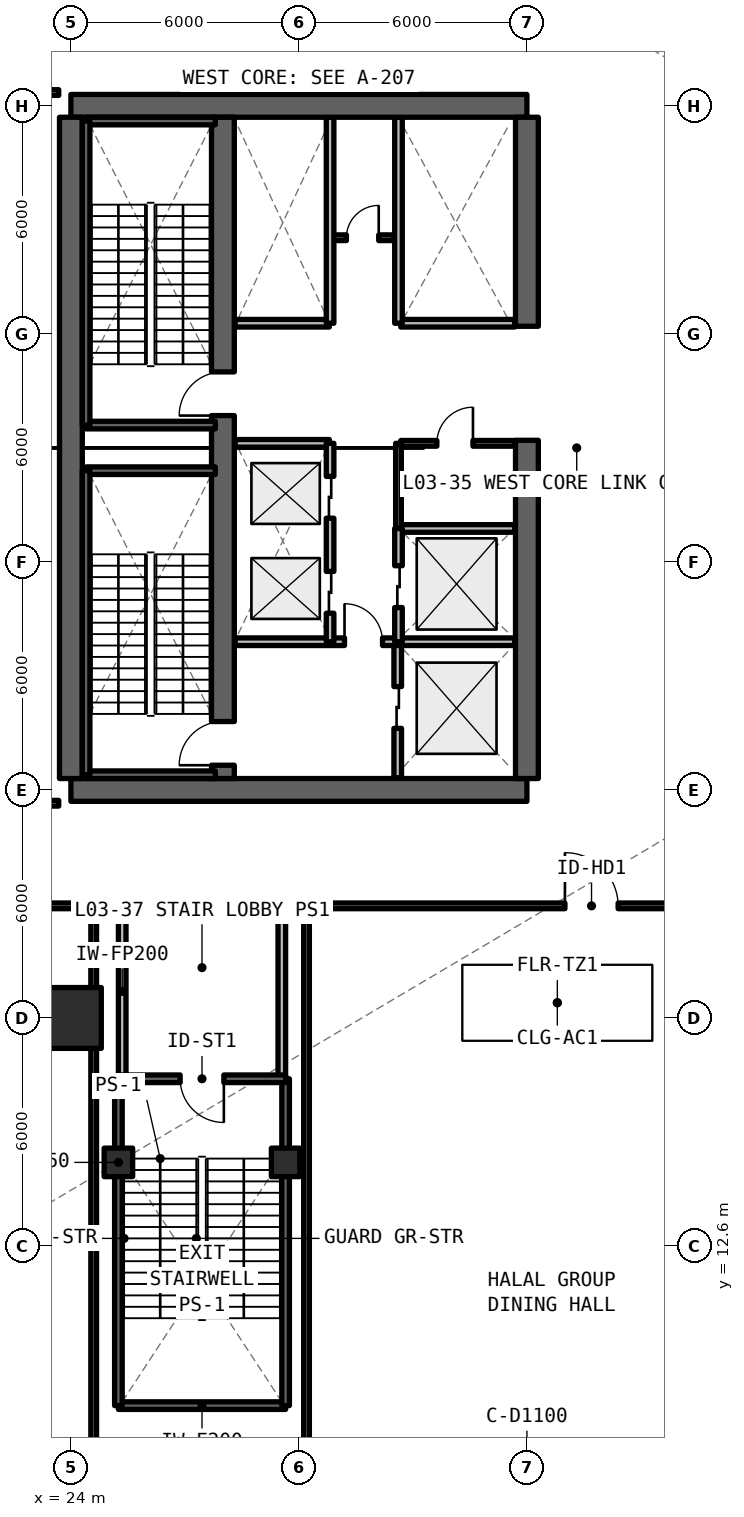
"""IFC4 building model, lengths in metres.
Left out: names, types, materials, properties, quantities, classifications, styles, units other than length and angle.
Written with IfcOpenShell. Run it as: python <this file> out.ifc"""

import sys

from ifc_helpers import new_model, si_unit, direction, frame, frame_2d, origin, origin_2d, place, context, subcontext, project, spatial, rectangle, extrude, element, fill, save


model = new_model("IFC4")
c1 = context("Model", 3, precision=1e-05, world=origin(), true_north=direction((0.0, 1.0)))
c2 = subcontext(c1, "Body", "Model", "MODEL_VIEW")
j1 = project(units=[si_unit("LENGTHUNIT", "METRE"), si_unit("PLANEANGLEUNIT", "RADIAN")], contexts=[c1])
p1 = place(None, origin())
s1 = spatial("IfcSite", under=j1, at=p1, CompositionType="ELEMENT")
p2 = place(p1, origin())
s2 = spatial("IfcBuilding", under=s1, at=p2, CompositionType="ELEMENT")
p3 = place(p2, frame((0.0, 0.0, 9.9)))
s3 = spatial("IfcBuildingStorey", under=s2, at=p3, CompositionType="ELEMENT", Elevation=9.9)
for number, where, z_axis, x_axis in (
    (1, (24.0, 24.6, 0.0), (0.0, 0.0, 1.0), (1.0, 0.0, 0.0)),
    (2, (36.0, 42.6, 0.0), (0.0, 0.0, 1.0), (-1.0, 0.0, 0.0)),
):
    element("IfcWall", number, at=place(p3, frame(where, z_axis=z_axis, x_axis=x_axis)), inside=s3, PredefinedType="SHEAR", context=c2, shape_type="SweptSolid", body=[
        extrude(rectangle(XDim=12.0, YDim=0.6, at=frame_2d((6.0, 0.0))), origin(), (0.0, 0.0, 1.0), 4.95),
    ])
p4 = place(p3, frame((24.0, 24.9, 0.0), z_axis=(0.0, 0.0, 1.0), x_axis=(0.0, 1.0, 0.0)))
e3 = element("IfcWall", 3, at=p4, inside=s3, PredefinedType="SHEAR", context=c2, shape_type="SweptSolid", body=[
    extrude(rectangle(XDim=17.4, YDim=0.6, at=frame_2d((8.7, 0.0))), origin(), (0.0, 0.0, 1.0), 4.95),
])
p5 = place(p3, frame((36.0, 24.9, 0.0), z_axis=(0.0, 0.0, 1.0), x_axis=(0.0, 1.0, 0.0)))
e4 = element("IfcWall", 4, at=p5, inside=s3, PredefinedType="SHEAR", context=c2, shape_type="SweptSolid", body=[
    extrude(rectangle(XDim=8.9, YDim=0.6, at=frame_2d((4.45, 0.0))), origin(), (0.0, 0.0, 1.0), 4.95),
])
p6 = place(p3, frame((36.0, 36.8, 0.0), z_axis=(0.0, 0.0, 1.0), x_axis=(0.0, 1.0, 0.0)))
e5 = element("IfcWall", 5, at=p6, inside=s3, PredefinedType="SHEAR", context=c2, shape_type="SweptSolid", body=[
    extrude(rectangle(XDim=5.5, YDim=0.6, at=frame_2d((2.75, 0.0))), origin(), (0.0, 0.0, 1.0), 4.95),
])
p7 = place(p3, frame((28.0, 24.9, 0.0), z_axis=(0.0, 0.0, 1.0), x_axis=(0.0, 1.0, 0.0)))
e6 = element("IfcWall", 6, at=p7, inside=s3, PredefinedType="SHEAR", context=c2, shape_type="SweptSolid", body=[
    extrude(rectangle(XDim=17.4, YDim=0.6, at=frame_2d((8.7, 0.0))), origin(), (0.0, 0.0, 1.0), 4.95),
])
p8 = place(p7, frame((0.35, 0.0, 0.0)))
e7 = element("IfcOpeningElement", 7, at=p8, cuts=e6, PredefinedType="OPENING", context=c2, shape_type="SweptSolid", body=[
    extrude(rectangle(XDim=1.15, YDim=2.15, at=frame_2d((0.575, 1.075))), frame((0.0, 0.31, 0.0), z_axis=(0.0, -1.0, 0.0), x_axis=(1.0, 0.0, 0.0)), (0.0, 0.0, 1.0), 0.62),
])
p9 = place(p7, frame((9.55, 0.0, 0.0)))
e8 = element("IfcOpeningElement", 8, at=p9, cuts=e6, PredefinedType="OPENING", context=c2, shape_type="SweptSolid", body=[
    extrude(rectangle(XDim=1.15, YDim=2.15, at=frame_2d((0.575, 1.075))), frame((0.0, 0.31, 0.0), z_axis=(0.0, -1.0, 0.0), x_axis=(1.0, 0.0, 0.0)), (0.0, 0.0, 1.0), 0.62),
])
p10 = place(p3, frame((24.0, 18.6, 0.0), z_axis=(0.0, 0.0, 1.0), x_axis=(1.0, 0.0, 0.0)))
e9 = element("IfcColumn", 9, at=p10, inside=s3, PredefinedType="COLUMN", context=c2, shape_type="SweptSolid", body=[
    extrude(rectangle(XDim=1.6, YDim=1.6, at=origin_2d()), origin(), (0.0, 0.0, 1.0), 4.95),
])
for number, where, z_axis, x_axis in (
    (10, (25.25, 14.8, 0.0), (0.0, 0.0, 1.0), (1.0, 0.0, 0.0)),
    (11, (29.65, 14.8, 0.0), (0.0, 0.0, 1.0), (1.0, 0.0, 0.0)),
):
    element("IfcColumn", number, at=place(p3, frame(where, z_axis=z_axis, x_axis=x_axis)), inside=s3, PredefinedType="COLUMN", context=c2, shape_type="SweptSolid", body=[
        extrude(rectangle(XDim=0.75, YDim=0.75, at=origin_2d()), origin(), (0.0, 0.0, 1.0), 4.95),
    ])
p11 = place(p3, frame((32.6, 24.92, 0.0), z_axis=(0.0, 0.0, 1.0), x_axis=(0.0, 1.0, 0.0)))
e12 = element("IfcWall", 12, at=p11, inside=s3, PredefinedType="SOLIDWALL", context=c2, shape_type="SweptSolid", body=[
    extrude(rectangle(XDim=3.58, YDim=0.2, at=frame_2d((1.79, 0.0))), origin(), (0.0, 0.0, 1.0), 3.89),
])
p12 = place(p11, frame((1.3, 0.0, 0.0)))
e13 = element("IfcOpeningElement", 13, at=p12, cuts=e12, PredefinedType="OPENING", context=c2, shape_type="SweptSolid", body=[
    extrude(rectangle(XDim=1.1, YDim=2.2, at=frame_2d((0.55, 1.1))), frame((0.0, 0.11, 0.0), z_axis=(0.0, -1.0, 0.0), x_axis=(1.0, 0.0, 0.0)), (0.0, 0.0, 1.0), 0.22),
])
p13 = place(p3, frame((28.32, 28.5, 0.0), z_axis=(0.0, 0.0, 1.0), x_axis=(1.0, 0.0, 0.0)))
e14 = element("IfcWall", 14, at=p13, inside=s3, PredefinedType="SOLIDWALL", context=c2, shape_type="SweptSolid", body=[
    extrude(rectangle(XDim=7.36, YDim=0.2, at=frame_2d((3.68, 0.0))), origin(), (0.0, 0.0, 1.0), 3.89),
])
p14 = place(p13, frame((2.88, 0.0, 0.0)))
e15 = element("IfcOpeningElement", 15, at=p14, cuts=e14, PredefinedType="OPENING", context=c2, shape_type="SweptSolid", body=[
    extrude(rectangle(XDim=1.0, YDim=2.15, at=frame_2d((0.5, 1.075))), frame((0.0, 0.11, 0.0), z_axis=(0.0, -1.0, 0.0), x_axis=(1.0, 0.0, 0.0)), (0.0, 0.0, 1.0), 0.22),
])
p15 = place(p3, frame((30.9, 39.13, 0.0), z_axis=(0.0, 0.0, 1.0), x_axis=(1.0, 0.0, 0.0)))
e16 = element("IfcWall", 16, at=p15, inside=s3, PredefinedType="SOLIDWALL", context=c2, shape_type="SweptSolid", body=[
    extrude(rectangle(XDim=1.6, YDim=0.15, at=frame_2d((0.8, 0.0))), origin(), (0.0, 0.0, 1.0), 3.89),
])
p16 = place(p15, frame((0.35, 0.0, 0.0)))
e17 = element("IfcOpeningElement", 17, at=p16, cuts=e16, PredefinedType="OPENING", context=c2, shape_type="SweptSolid", body=[
    extrude(rectangle(XDim=0.85, YDim=2.1, at=frame_2d((0.425, 1.05))), frame((0.0, 0.085, 0.0), z_axis=(0.0, -1.0, 0.0), x_axis=(1.0, 0.0, 0.0)), (0.0, 0.0, 1.0), 0.17),
])
p17 = place(p3, frame((28.32, 33.72, 0.0), z_axis=(0.0, 0.0, 1.0), x_axis=(1.0, 0.0, 0.0)))
e18 = element("IfcWall", 18, at=p17, inside=s3, PredefinedType="SOLIDWALL", context=c2, shape_type="SweptSolid", body=[
    extrude(rectangle(XDim=2.48, YDim=0.2, at=frame_2d((1.24, 0.0))), origin(), (0.0, 0.0, 1.0), 3.89),
])
p18 = place(p3, frame((30.82, 28.5, 0.0), z_axis=(0.0, 0.0, 1.0), x_axis=(0.0, 1.0, 0.0)))
e19 = element("IfcWall", 19, at=p18, inside=s3, PredefinedType="SOLIDWALL", context=c2, shape_type="SweptSolid", body=[
    extrude(rectangle(XDim=5.22, YDim=0.2, at=frame_2d((2.61, 0.0))), origin(), (0.0, 0.0, 1.0), 3.89),
])
p19 = place(p18, frame((0.75, 0.0, 0.0)))
e20 = element("IfcOpeningElement", 20, at=p19, cuts=e19, PredefinedType="OPENING", context=c2, shape_type="SweptSolid", body=[
    extrude(rectangle(XDim=1.1, YDim=2.2, at=frame_2d((0.55, 1.1))), frame((0.0, 0.11, 0.0), z_axis=(0.0, -1.0, 0.0), x_axis=(1.0, 0.0, 0.0)), (0.0, 0.0, 1.0), 0.22),
])
p20 = place(p18, frame((3.25, 0.0, 0.0)))
e21 = element("IfcOpeningElement", 21, at=p20, cuts=e19, PredefinedType="OPENING", context=c2, shape_type="SweptSolid", body=[
    extrude(rectangle(XDim=1.1, YDim=2.2, at=frame_2d((0.55, 1.1))), frame((0.0, 0.11, 0.0), z_axis=(0.0, -1.0, 0.0), x_axis=(1.0, 0.0, 0.0)), (0.0, 0.0, 1.0), 0.22),
])
p21 = place(p3, frame((32.68, 31.48, 0.0), z_axis=(0.0, 0.0, 1.0), x_axis=(1.0, 0.0, 0.0)))
e22 = element("IfcWall", 22, at=p21, inside=s3, PredefinedType="SOLIDWALL", context=c2, shape_type="SweptSolid", body=[
    extrude(rectangle(XDim=3.0, YDim=0.2, at=frame_2d((1.5, 0.0))), origin(), (0.0, 0.0, 1.0), 3.89),
])
p22 = place(p3, frame((32.62, 28.5, 0.0), z_axis=(0.0, 0.0, 1.0), x_axis=(0.0, 1.0, 0.0)))
e23 = element("IfcWall", 23, at=p22, inside=s3, PredefinedType="SOLIDWALL", context=c2, shape_type="SweptSolid", body=[
    extrude(rectangle(XDim=2.98, YDim=0.2, at=frame_2d((1.49, 0.0))), origin(), (0.0, 0.0, 1.0), 3.89),
])
p23 = place(p22, frame((0.9, 0.0, 0.0)))
e24 = element("IfcOpeningElement", 24, at=p23, cuts=e23, PredefinedType="OPENING", context=c2, shape_type="SweptSolid", body=[
    extrude(rectangle(XDim=1.1, YDim=2.2, at=frame_2d((0.55, 1.1))), frame((0.0, 0.11, 0.0), z_axis=(0.0, -1.0, 0.0), x_axis=(1.0, 0.0, 0.0)), (0.0, 0.0, 1.0), 0.22),
])
p24 = place(p3, frame((32.62, 31.48, 0.0), z_axis=(0.0, 0.0, 1.0), x_axis=(0.0, 1.0, 0.0)))
e25 = element("IfcWall", 25, at=p24, inside=s3, PredefinedType="SOLIDWALL", context=c2, shape_type="SweptSolid", body=[
    extrude(rectangle(XDim=2.24, YDim=0.15, at=frame_2d((1.12, 0.0))), origin(), (0.0, 0.0, 1.0), 3.89),
])
p25 = place(p3, frame((32.68, 33.72, 0.0), z_axis=(0.0, 0.0, 1.0), x_axis=(1.0, 0.0, 0.0)))
e26 = element("IfcWall", 26, at=p25, inside=s3, PredefinedType="SOLIDWALL", context=c2, shape_type="SweptSolid", body=[
    extrude(rectangle(XDim=3.0, YDim=0.15, at=frame_2d((1.5, 0.0))), origin(), (0.0, 0.0, 1.0), 3.89),
])
p26 = place(p25, frame((0.95, 0.0, 0.0)))
e27 = element("IfcOpeningElement", 27, at=p26, cuts=e26, PredefinedType="OPENING", context=c2, shape_type="SweptSolid", body=[
    extrude(rectangle(XDim=0.95, YDim=2.15, at=frame_2d((0.475, 1.075))), frame((0.0, 0.085, 0.0), z_axis=(0.0, -1.0, 0.0), x_axis=(1.0, 0.0, 0.0)), (0.0, 0.0, 1.0), 0.17),
])
p27 = place(p3, frame((28.32, 36.88, 0.0), z_axis=(0.0, 0.0, 1.0), x_axis=(1.0, 0.0, 0.0)))
e28 = element("IfcWall", 28, at=p27, inside=s3, PredefinedType="SOLIDWALL", context=c2, shape_type="SweptSolid", body=[
    extrude(rectangle(XDim=2.48, YDim=0.2, at=frame_2d((1.24, 0.0))), origin(), (0.0, 0.0, 1.0), 3.89),
])
p28 = place(p3, frame((30.82, 36.88, 0.0), z_axis=(0.0, 0.0, 1.0), x_axis=(0.0, 1.0, 0.0)))
e29 = element("IfcWall", 29, at=p28, inside=s3, PredefinedType="SOLIDWALL", context=c2, shape_type="SweptSolid", body=[
    extrude(rectangle(XDim=5.42, YDim=0.2, at=frame_2d((2.71, 0.0))), origin(), (0.0, 0.0, 1.0), 3.89),
])
p29 = place(p3, frame((32.68, 36.88, 0.0), z_axis=(0.0, 0.0, 1.0), x_axis=(1.0, 0.0, 0.0)))
e30 = element("IfcWall", 30, at=p29, inside=s3, PredefinedType="SOLIDWALL", context=c2, shape_type="SweptSolid", body=[
    extrude(rectangle(XDim=3.0, YDim=0.2, at=frame_2d((1.5, 0.0))), origin(), (0.0, 0.0, 1.0), 3.89),
])
p30 = place(p3, frame((32.62, 36.88, 0.0), z_axis=(0.0, 0.0, 1.0), x_axis=(0.0, 1.0, 0.0)))
e31 = element("IfcWall", 31, at=p30, inside=s3, PredefinedType="SOLIDWALL", context=c2, shape_type="SweptSolid", body=[
    extrude(rectangle(XDim=5.42, YDim=0.2, at=frame_2d((2.71, 0.0))), origin(), (0.0, 0.0, 1.0), 3.89),
])
for number, where, z_axis, x_axis in (
    (32, (25.35, 17.0, 0.0), (0.0, 0.0, 1.0), (0.0, 1.0, 0.0)),
    (33, (29.55, 17.0, 0.0), (0.0, 0.0, 1.0), (0.0, 1.0, 0.0)),
):
    element("IfcWall", number, at=place(p3, frame(where, z_axis=z_axis, x_axis=x_axis)), inside=s3, PredefinedType="SOLIDWALL", context=c2, shape_type="SweptSolid", body=[
        extrude(rectangle(XDim=4.6, YDim=0.2, at=frame_2d((2.3, 0.0))), origin(), (0.0, 0.0, 1.0), 3.89),
    ])
p31 = place(p3, frame((6.4, 21.55, 0.0), z_axis=(0.0, 0.0, 1.0), x_axis=(1.0, 0.0, 0.0)))
e34 = element("IfcWall", 34, at=p31, inside=s3, PredefinedType="SOLIDWALL", context=c2, shape_type="SweptSolid", body=[
    extrude(rectangle(XDim=18.2, YDim=0.15, at=frame_2d((9.1, 0.0))), origin(), (0.0, 0.0, 1.0), 3.89),
])
p32 = place(p31, frame((8.55, 0.0, 0.0)))
e35 = element("IfcOpeningElement", 35, at=p32, cuts=e34, PredefinedType="OPENING", context=c2, shape_type="SweptSolid", body=[
    extrude(rectangle(XDim=1.1, YDim=2.15, at=frame_2d((0.55, 1.075))), frame((0.0, 0.085, 0.0), z_axis=(0.0, -1.0, 0.0), x_axis=(1.0, 0.0, 0.0)), (0.0, 0.0, 1.0), 0.17),
])
p33 = place(p3, frame((24.6, 2.3, 0.0), z_axis=(0.0, 0.0, 1.0), x_axis=(0.0, 1.0, 0.0)))
e36 = element("IfcWall", 36, at=p33, inside=s3, PredefinedType="SOLIDWALL", context=c2, shape_type="SweptSolid", body=[
    extrude(rectangle(XDim=19.25, YDim=0.15, at=frame_2d((9.625, 0.0))), origin(), (0.0, 0.0, 1.0), 3.89),
])
p34 = place(p3, frame((30.2, 21.55, 0.0), z_axis=(0.0, 0.0, 1.0), x_axis=(1.0, 0.0, 0.0)))
e37 = element("IfcWall", 37, at=p34, inside=s3, PredefinedType="SOLIDWALL", context=c2, shape_type="SweptSolid", body=[
    extrude(rectangle(XDim=12.95, YDim=0.15, at=frame_2d((6.475, 0.0))), origin(), (0.0, 0.0, 1.0), 3.89),
])
p35 = place(p34, frame((6.8, 0.0, 0.0)))
e38 = element("IfcOpeningElement", 38, at=p35, cuts=e37, PredefinedType="OPENING", context=c2, shape_type="SweptSolid", body=[
    extrude(rectangle(XDim=1.4, YDim=2.15, at=frame_2d((0.7, 1.075))), frame((0.0, 0.085, 0.0), z_axis=(0.0, -1.0, 0.0), x_axis=(1.0, 0.0, 0.0)), (0.0, 0.0, 1.0), 0.17),
])
p36 = place(p3, frame((30.2, 2.3, 0.0), z_axis=(0.0, 0.0, 1.0), x_axis=(0.0, 1.0, 0.0)))
e39 = element("IfcWall", 39, at=p36, inside=s3, PredefinedType="SOLIDWALL", context=c2, shape_type="SweptSolid", body=[
    extrude(rectangle(XDim=19.25, YDim=0.15, at=frame_2d((9.625, 0.0))), origin(), (0.0, 0.0, 1.0), 3.89),
])
p37 = place(p3, frame((6.4, 24.25, 0.0), z_axis=(0.0, 0.0, 1.0), x_axis=(1.0, 0.0, 0.0)))
e40 = element("IfcWall", 40, at=p37, inside=s3, PredefinedType="SOLIDWALL", context=c2, shape_type="SweptSolid", body=[
    extrude(rectangle(XDim=17.28, YDim=0.15, at=frame_2d((8.64, 0.0))), origin(), (0.0, 0.0, 1.0), 3.89),
])
p38 = place(p37, frame((8.09, 0.0, 0.0)))
e41 = element("IfcOpeningElement", 41, at=p38, cuts=e40, PredefinedType="OPENING", context=c2, shape_type="SweptSolid", body=[
    extrude(rectangle(XDim=1.1, YDim=2.15, at=frame_2d((0.55, 1.075))), frame((0.0, 0.085, 0.0), z_axis=(0.0, -1.0, 0.0), x_axis=(1.0, 0.0, 0.0)), (0.0, 0.0, 1.0), 0.17),
])
p39 = place(p3, frame((6.4, 42.95, 0.0), z_axis=(0.0, 0.0, 1.0), x_axis=(1.0, 0.0, 0.0)))
e42 = element("IfcWall", 42, at=p39, inside=s3, PredefinedType="SOLIDWALL", context=c2, shape_type="SweptSolid", body=[
    extrude(rectangle(XDim=17.28, YDim=0.15, at=frame_2d((8.64, 0.0))), origin(), (0.0, 0.0, 1.0), 3.89),
])
for number, where, z_axis, x_axis in (
    (43, (24.4, 25.0, 0.0), (0.0, 0.0, 1.0), (1.0, 0.0, 0.0)),
    (44, (27.8, 33.0, 0.0), (0.0, 0.0, 1.0), (-1.0, 0.0, 0.0)),
):
    element("IfcWall", number, at=place(p3, frame(where, z_axis=z_axis, x_axis=x_axis)), inside=s3, PredefinedType="SOLIDWALL", context=c2, shape_type="SweptSolid", body=[
        extrude(rectangle(XDim=3.4, YDim=0.2, at=frame_2d((1.7, 0.0))), origin(), (0.0, 0.0, 1.0), 4.95),
    ])
p40 = place(p3, frame((24.4, 33.0, 0.0), z_axis=(0.0, 0.0, 1.0), x_axis=(0.0, -1.0, 0.0)))
e45 = element("IfcWall", 45, at=p40, inside=s3, PredefinedType="SOLIDWALL", context=c2, shape_type="SweptSolid", body=[
    extrude(rectangle(XDim=8.0, YDim=0.2, at=frame_2d((4.0, 0.0))), origin(), (0.0, 0.0, 1.0), 4.95),
])
for number, where, z_axis, x_axis in (
    (46, (24.4, 34.2, 0.0), (0.0, 0.0, 1.0), (1.0, 0.0, 0.0)),
    (47, (27.8, 42.2, 0.0), (0.0, 0.0, 1.0), (-1.0, 0.0, 0.0)),
):
    element("IfcWall", number, at=place(p3, frame(where, z_axis=z_axis, x_axis=x_axis)), inside=s3, PredefinedType="SOLIDWALL", context=c2, shape_type="SweptSolid", body=[
        extrude(rectangle(XDim=3.4, YDim=0.2, at=frame_2d((1.7, 0.0))), origin(), (0.0, 0.0, 1.0), 4.95),
    ])
p41 = place(p3, frame((24.4, 42.2, 0.0), z_axis=(0.0, 0.0, 1.0), x_axis=(0.0, -1.0, 0.0)))
e48 = element("IfcWall", 48, at=p41, inside=s3, PredefinedType="SOLIDWALL", context=c2, shape_type="SweptSolid", body=[
    extrude(rectangle(XDim=8.0, YDim=0.2, at=frame_2d((4.0, 0.0))), origin(), (0.0, 0.0, 1.0), 4.95),
])
p42 = place(p3, frame((25.25, 8.4, 0.0), z_axis=(0.0, 0.0, 1.0), x_axis=(1.0, 0.0, 0.0)))
e49 = element("IfcWall", 49, at=p42, inside=s3, PredefinedType="SOLIDWALL", context=c2, shape_type="SweptSolid", body=[
    extrude(rectangle(XDim=4.4, YDim=0.2, at=frame_2d((2.2, 0.0))), origin(), (0.0, 0.0, 1.0), 4.95),
])
p43 = place(p3, frame((29.65, 8.4, 0.0), z_axis=(0.0, 0.0, 1.0), x_axis=(0.0, 1.0, 0.0)))
e50 = element("IfcWall", 50, at=p43, inside=s3, PredefinedType="SOLIDWALL", context=c2, shape_type="SweptSolid", body=[
    extrude(rectangle(XDim=8.6, YDim=0.2, at=frame_2d((4.3, 0.0))), origin(), (0.0, 0.0, 1.0), 4.95),
])
p44 = place(p3, frame((29.65, 17.0, 0.0), z_axis=(0.0, 0.0, 1.0), x_axis=(-1.0, 0.0, 0.0)))
e51 = element("IfcWall", 51, at=p44, inside=s3, PredefinedType="SOLIDWALL", context=c2, shape_type="SweptSolid", body=[
    extrude(rectangle(XDim=4.4, YDim=0.2, at=frame_2d((2.2, 0.0))), origin(), (0.0, 0.0, 1.0), 4.95),
])
p45 = place(p44, frame((1.625, 0.0, 0.0)))
e52 = element("IfcOpeningElement", 52, at=p45, cuts=e51, PredefinedType="OPENING", context=c2, shape_type="SweptSolid", body=[
    extrude(rectangle(XDim=1.15, YDim=2.15, at=frame_2d((0.575, 1.075))), frame((0.0, 0.11, 0.0), z_axis=(0.0, -1.0, 0.0), x_axis=(1.0, 0.0, 0.0)), (0.0, 0.0, 1.0), 0.22),
])
p46 = place(p3, frame((25.25, 17.0, 0.0), z_axis=(0.0, 0.0, 1.0), x_axis=(0.0, -1.0, 0.0)))
e53 = element("IfcWall", 53, at=p46, inside=s3, PredefinedType="SOLIDWALL", context=c2, shape_type="SweptSolid", body=[
    extrude(rectangle(XDim=8.6, YDim=0.2, at=frame_2d((4.3, 0.0))), origin(), (0.0, 0.0, 1.0), 4.95),
])
p47 = place(p12, origin())
e54 = element("IfcDoor", 54, at=p47, inside=s3, OperationType="SLIDING_TO_LEFT", PredefinedType="DOOR", context=c2, shape_type="SweptSolid", body=[
    extrude(rectangle(XDim=1.1, YDim=2.2, at=frame_2d((0.55, 1.1))), frame((0.0, 0.025, 0.0), z_axis=(0.0, -1.0, 0.0), x_axis=(1.0, 0.0, 0.0)), (0.0, 0.0, 1.0), 0.05),
])
fill(e13, e54)
p48 = place(p14, origin())
e55 = element("IfcDoor", 55, at=p48, inside=s3, OperationType="SINGLE_SWING_LEFT", PredefinedType="DOOR", context=c2, shape_type="SweptSolid", body=[
    extrude(rectangle(XDim=1.0, YDim=2.15, at=frame_2d((0.5, 1.075))), frame((0.0, 0.025, 0.0), z_axis=(0.0, -1.0, 0.0), x_axis=(1.0, 0.0, 0.0)), (0.0, 0.0, 1.0), 0.05),
])
fill(e15, e55)
p49 = place(p16, origin())
e56 = element("IfcDoor", 56, at=p49, inside=s3, OperationType="SINGLE_SWING_RIGHT", PredefinedType="DOOR", context=c2, shape_type="SweptSolid", body=[
    extrude(rectangle(XDim=0.85, YDim=2.1, at=frame_2d((0.425, 1.05))), frame((0.0, 0.025, 0.0), z_axis=(0.0, -1.0, 0.0), x_axis=(1.0, 0.0, 0.0)), (0.0, 0.0, 1.0), 0.05),
])
fill(e17, e56)
p50 = place(p19, origin())
e57 = element("IfcDoor", 57, at=p50, inside=s3, OperationType="SLIDING_TO_LEFT", PredefinedType="DOOR", context=c2, shape_type="SweptSolid", body=[
    extrude(rectangle(XDim=1.1, YDim=2.2, at=frame_2d((0.55, 1.1))), frame((0.0, 0.025, 0.0), z_axis=(0.0, -1.0, 0.0), x_axis=(1.0, 0.0, 0.0)), (0.0, 0.0, 1.0), 0.05),
])
fill(e20, e57)
p51 = place(p20, origin())
e58 = element("IfcDoor", 58, at=p51, inside=s3, OperationType="SLIDING_TO_RIGHT", PredefinedType="DOOR", context=c2, shape_type="SweptSolid", body=[
    extrude(rectangle(XDim=1.1, YDim=2.2, at=frame_2d((0.55, 1.1))), frame((0.0, 0.025, 0.0), z_axis=(0.0, -1.0, 0.0), x_axis=(1.0, 0.0, 0.0)), (0.0, 0.0, 1.0), 0.05),
])
fill(e21, e58)
p52 = place(p23, origin())
e59 = element("IfcDoor", 59, at=p52, inside=s3, OperationType="SLIDING_TO_LEFT", PredefinedType="DOOR", context=c2, shape_type="SweptSolid", body=[
    extrude(rectangle(XDim=1.1, YDim=2.2, at=frame_2d((0.55, 1.1))), frame((0.0, 0.025, 0.0), z_axis=(0.0, -1.0, 0.0), x_axis=(1.0, 0.0, 0.0)), (0.0, 0.0, 1.0), 0.05),
])
fill(e24, e59)
p53 = place(p26, origin())
e60 = element("IfcDoor", 60, at=p53, inside=s3, OperationType="SINGLE_SWING_RIGHT", PredefinedType="DOOR", context=c2, shape_type="SweptSolid", body=[
    extrude(rectangle(XDim=0.95, YDim=2.15, at=frame_2d((0.475, 1.075))), frame((0.0, 0.025, 0.0), z_axis=(0.0, -1.0, 0.0), x_axis=(1.0, 0.0, 0.0)), (0.0, 0.0, 1.0), 0.05),
])
fill(e27, e60)
p54 = place(p35, origin())
e61 = element("IfcDoor", 61, at=p54, inside=s3, OperationType="SINGLE_SWING_LEFT", PredefinedType="DOOR", context=c2, shape_type="SweptSolid", body=[
    extrude(rectangle(XDim=1.4, YDim=2.15, at=frame_2d((0.7, 1.075))), frame((0.0, 0.025, 0.0), z_axis=(0.0, -1.0, 0.0), x_axis=(1.0, 0.0, 0.0)), (0.0, 0.0, 1.0), 0.05),
])
fill(e38, e61)
p55 = place(p8, origin())
e62 = element("IfcDoor", 62, at=p55, inside=s3, OperationType="SINGLE_SWING_RIGHT", PredefinedType="DOOR", context=c2, shape_type="SweptSolid", body=[
    extrude(rectangle(XDim=1.15, YDim=2.15, at=frame_2d((0.575, 1.075))), frame((0.0, 0.025, 0.0), z_axis=(0.0, -1.0, 0.0), x_axis=(1.0, 0.0, 0.0)), (0.0, 0.0, 1.0), 0.05),
])
fill(e7, e62)
p56 = place(p9, origin())
e63 = element("IfcDoor", 63, at=p56, inside=s3, OperationType="SINGLE_SWING_LEFT", PredefinedType="DOOR", context=c2, shape_type="SweptSolid", body=[
    extrude(rectangle(XDim=1.15, YDim=2.15, at=frame_2d((0.575, 1.075))), frame((0.0, 0.025, 0.0), z_axis=(0.0, -1.0, 0.0), x_axis=(1.0, 0.0, 0.0)), (0.0, 0.0, 1.0), 0.05),
])
fill(e8, e63)
p57 = place(p45, origin())
e64 = element("IfcDoor", 64, at=p57, inside=s3, OperationType="SINGLE_SWING_RIGHT", PredefinedType="DOOR", context=c2, shape_type="SweptSolid", body=[
    extrude(rectangle(XDim=1.15, YDim=2.15, at=frame_2d((0.575, 1.075))), frame((0.0, 0.025, 0.0), z_axis=(0.0, -1.0, 0.0), x_axis=(1.0, 0.0, 0.0)), (0.0, 0.0, 1.0), 0.05),
])
fill(e52, e64)
save(model, sys.argv[1])
